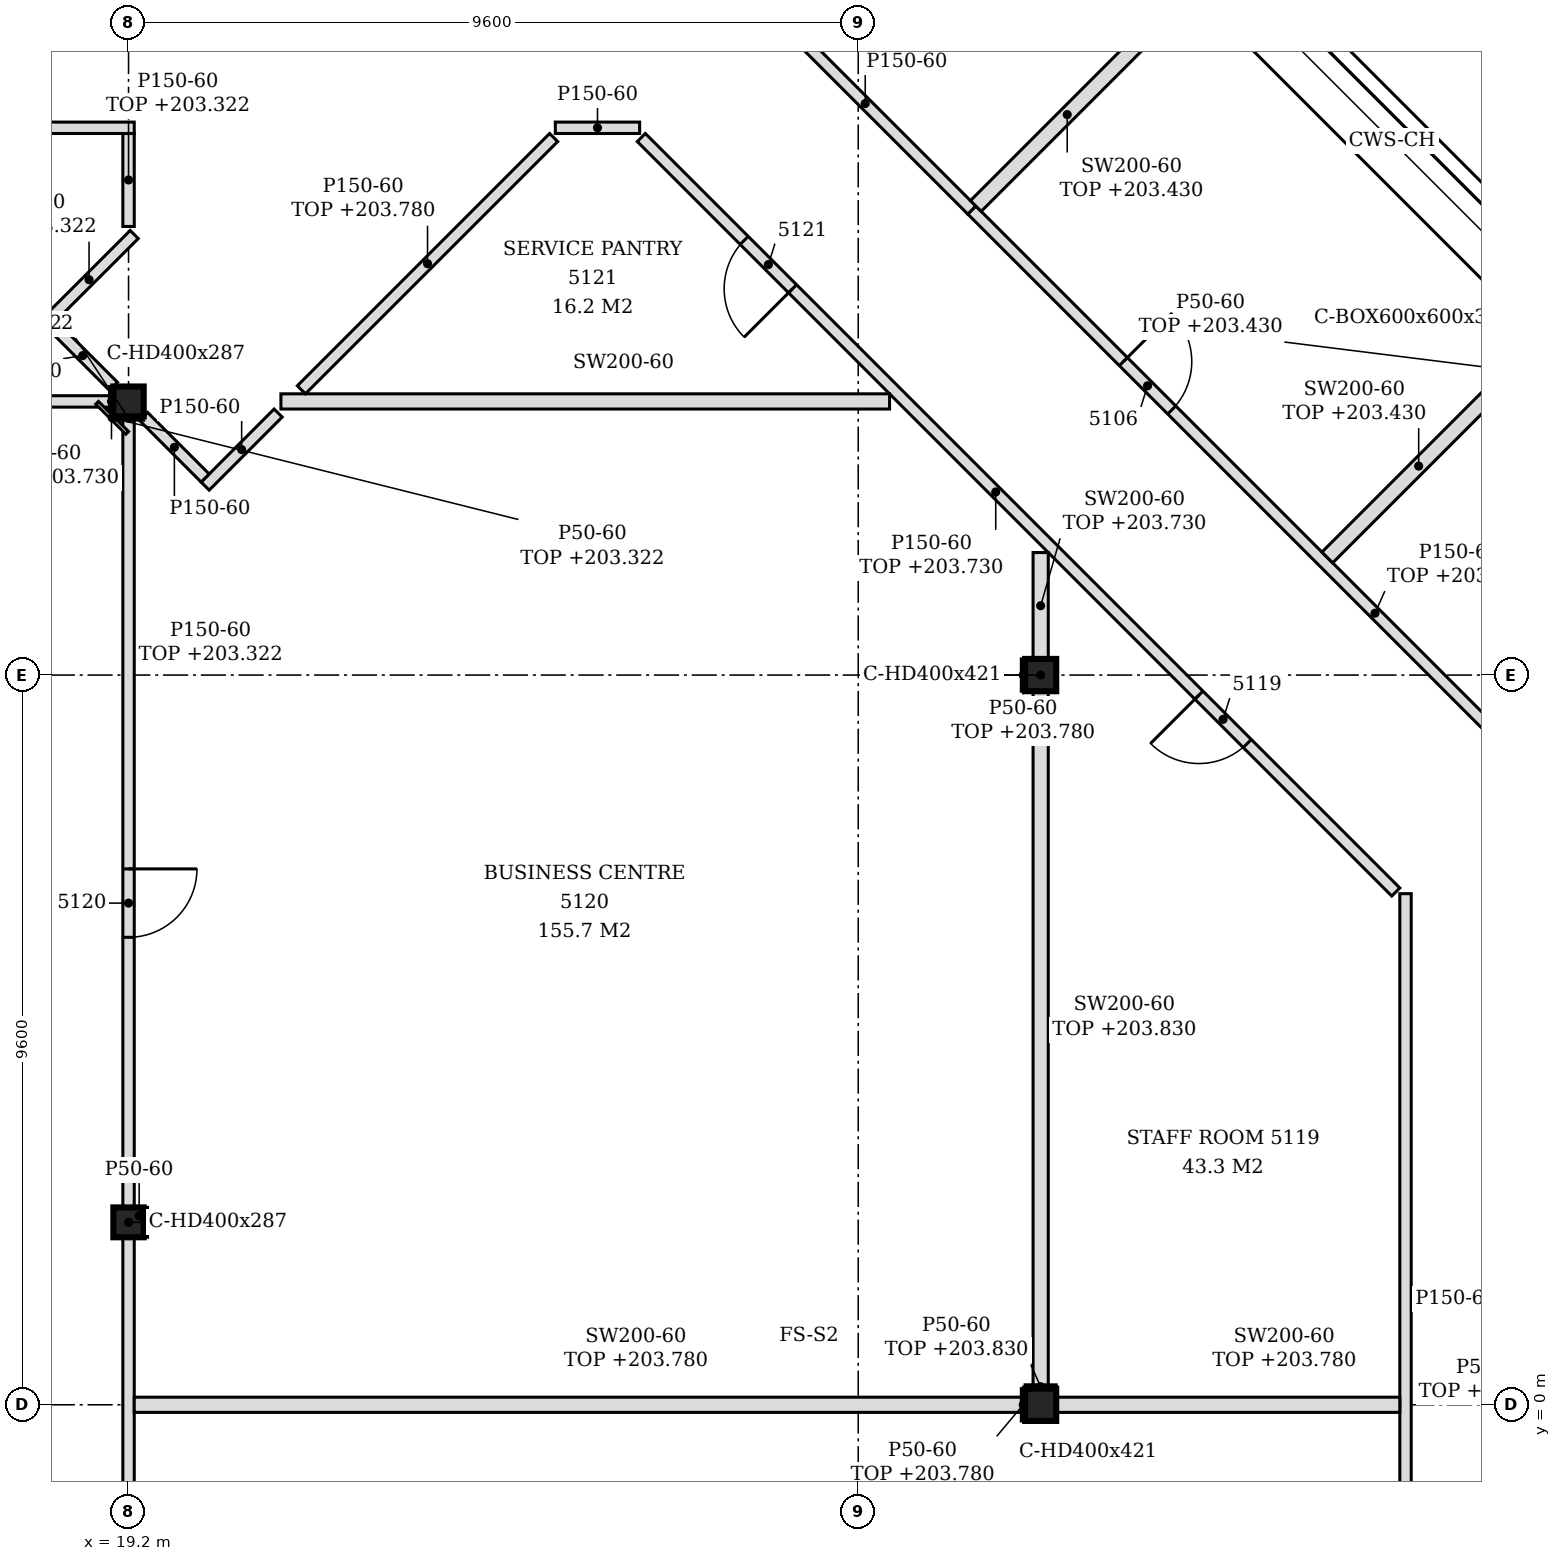
"""IFC4 building model, lengths in metres.
Left out: names, types, materials, properties, quantities, classifications, styles, units other than length and angle.
Written with IfcOpenShell. Run it as: python <this file> out.ifc"""

import sys

from ifc_helpers import new_model, si_unit, direction, frame, frame_2d, origin, origin_2d, place, context, subcontext, project, spatial, polyline, rectangle, i_section, outline, extrude, element, fill, save


model = new_model("IFC4")
c1 = context("Model", 3, precision=1e-05, world=origin(), true_north=direction((0.0, 1.0)))
c2 = subcontext(c1, "Body", "Model", "MODEL_VIEW")
j1 = project(units=[si_unit("LENGTHUNIT", "METRE"), si_unit("PLANEANGLEUNIT", "RADIAN")], contexts=[c1])
p1 = place(None, origin())
s1 = spatial("IfcSite", under=j1, at=p1, CompositionType="ELEMENT")
p2 = place(p1, origin())
s2 = spatial("IfcBuilding", under=s1, at=p2, CompositionType="ELEMENT")
p3 = place(p2, frame((0.0, 0.0, 201.0)))
s3 = spatial("IfcBuildingStorey", under=s2, at=p3, CompositionType="ELEMENT", Elevation=201.0)
for number, where, z_axis, x_axis in (
    (1, (19.2, 2.4, -0.15), (0.0, 0.0, 1.0), (1.0, 0.0, 0.0)),
    (2, (19.2, 13.2, -0.15), (0.0, 0.0, 1.0), (1.0, 0.0, 0.0)),
):
    element("IfcColumn", number, at=place(p3, frame(where, z_axis=z_axis, x_axis=x_axis)), inside=s3, PredefinedType="COLUMN", context=c2, shape_type="SweptSolid", body=[
        extrude(i_section(OverallWidth=0.399, OverallDepth=0.393, WebThickness=0.023, FlangeThickness=0.037, FilletRadius=0.015, at=origin_2d()), origin(), (0.0, 0.0, 1.0), 3.5),
    ])
for number, where, z_axis, x_axis in (
    (3, (31.2, 0.0, -0.15), (0.0, 0.0, 1.0), (1.0, 0.0, 0.0)),
    (4, (31.2, 9.6, -0.15), (0.0, 0.0, 1.0), (1.0, 0.0, 0.0)),
):
    element("IfcColumn", number, at=place(p3, frame(where, z_axis=z_axis, x_axis=x_axis)), inside=s3, PredefinedType="COLUMN", context=c2, shape_type="SweptSolid", body=[
        extrude(i_section(OverallWidth=0.409, OverallDepth=0.425, WebThickness=0.033, FlangeThickness=0.052, FilletRadius=0.015, at=origin_2d()), origin(), (0.0, 0.0, 1.0), 3.5),
    ])
p4 = place(p3, frame((19.2, -5.925, 0.0), z_axis=(0.0, 0.0, 1.0), x_axis=(0.0, 1.0, 0.0)))
e5 = element("IfcWall", 5, at=p4, inside=s3, PredefinedType="PARTITIONING", context=c2, shape_type="SweptSolid", body=[
    extrude(rectangle(XDim=8.129, YDim=0.15, at=frame_2d((4.064, 0.0))), origin(), (0.0, 0.0, 1.0), 2.322),
])
p5 = place(p3, frame((36.0, -5.925, 0.0), z_axis=(0.0, 0.0, 1.0), x_axis=(0.0, 1.0, 0.0)))
e6 = element("IfcWall", 6, at=p5, inside=s3, PredefinedType="PARTITIONING", context=c2, shape_type="SweptSolid", body=[
    extrude(outline(polyline([(0.0, 0.0), (12.649, 0.0), (12.649, 3.35), (10.83, 3.35), (10.828, 2.78), (10.62, 2.78), (10.618, 3.35), (6.03, 3.35), (6.028, 2.78), (5.82, 2.78), (5.818, 3.35), (1.23, 3.35), (1.228, 2.78), (1.02, 2.78), (1.018, 3.35), (0.0, 3.35), (0.0, 0.0)])), frame((0.0, 0.075, 0.0), z_axis=(0.0, -1.0, 0.0), x_axis=(1.0, 0.0, 0.0)), (0.0, 0.0, 1.0), 0.15),
])
p6 = place(p5, frame((1.175, 0.0, 0.0)))
e7 = element("IfcOpeningElement", 7, at=p6, cuts=e6, PredefinedType="OPENING", context=c2, shape_type="SweptSolid", body=[
    extrude(rectangle(XDim=0.8, YDim=2.1, at=frame_2d((0.4, 1.05))), frame((0.0, 0.085, 0.0), z_axis=(0.0, -1.0, 0.0), x_axis=(1.0, 0.0, 0.0)), (0.0, 0.0, 1.0), 0.17),
])
p7 = place(p3, frame((19.275, 0.0, 0.0), z_axis=(0.0, 0.0, 1.0), x_axis=(1.0, 0.0, 0.0)))
e8 = element("IfcWall", 8, at=p7, inside=s3, PredefinedType="PARTITIONING", context=c2, shape_type="SweptSolid", body=[
    extrude(outline(polyline([(0.0, 0.0), (11.721, 0.0), (11.72, 2.78), (0.076, 2.78), (0.074, 2.322), (0.0, 2.322), (0.0, 0.0)])), frame((0.0, 0.1, 0.0), z_axis=(0.0, -1.0, 0.0), x_axis=(1.0, 0.0, 0.0)), (0.0, 0.0, 1.0), 0.2),
])
p8 = place(p3, frame((31.405, 0.0, 0.0), z_axis=(0.0, 0.0, 1.0), x_axis=(1.0, 0.0, 0.0)))
e9 = element("IfcWall", 9, at=p8, inside=s3, PredefinedType="PARTITIONING", context=c2, shape_type="SweptSolid", body=[
    extrude(rectangle(XDim=4.521, YDim=0.2, at=frame_2d((2.26, 0.0))), origin(), (0.0, 0.0, 1.0), 2.78),
])
p9 = place(p3, frame((31.2, 0.212, 0.0), z_axis=(0.0, 0.0, 1.0), x_axis=(0.0, 1.0, 0.0)))
e10 = element("IfcWall", 10, at=p9, inside=s3, PredefinedType="PARTITIONING", context=c2, shape_type="SweptSolid", body=[
    extrude(rectangle(XDim=9.175, YDim=0.2, at=frame_2d((4.587, 0.0))), origin(), (0.0, 0.0, 1.0), 2.83),
])
p10 = place(p3, frame((19.2, 2.596, 0.0), z_axis=(0.0, 0.0, 1.0), x_axis=(0.0, 1.0, 0.0)))
e11 = element("IfcWall", 11, at=p10, inside=s3, PredefinedType="PARTITIONING", context=c2, shape_type="SweptSolid", body=[
    extrude(rectangle(XDim=10.407, YDim=0.15, at=frame_2d((5.204, 0.0))), origin(), (0.0, 0.0, 1.0), 2.322),
])
p11 = place(p10, frame((3.553, 0.0, 0.0)))
e12 = element("IfcOpeningElement", 12, at=p11, cuts=e11, PredefinedType="OPENING", context=c2, shape_type="SweptSolid", body=[
    extrude(rectangle(XDim=0.9, YDim=2.1, at=frame_2d((0.45, 1.05))), frame((0.0, 0.085, 0.0), z_axis=(0.0, -1.0, 0.0), x_axis=(1.0, 0.0, 0.0)), (0.0, 0.0, 1.0), 0.17),
])
p12 = place(p3, frame((35.872, 6.746, 0.0), z_axis=(0.0, 0.0, 1.0), x_axis=(-0.707106781187, 0.707106781187, 0.0)))
e13 = element("IfcWall", 13, at=p12, inside=s3, PredefinedType="PARTITIONING", context=c2, shape_type="SweptSolid", body=[
    extrude(rectangle(XDim=14.038, YDim=0.15, at=frame_2d((7.019, 0.0))), origin(), (0.0, 0.0, 1.0), 2.73),
])
p13 = place(p12, frame((2.763, 0.0, 0.0)))
e14 = element("IfcOpeningElement", 14, at=p13, cuts=e13, PredefinedType="OPENING", context=c2, shape_type="SweptSolid", body=[
    extrude(rectangle(XDim=0.9, YDim=2.1, at=frame_2d((0.45, 1.05))), frame((0.0, 0.085, 0.0), z_axis=(0.0, -1.0, 0.0), x_axis=(1.0, 0.0, 0.0)), (0.0, 0.0, 1.0), 0.17),
])
p14 = place(p12, frame((11.223, 0.0, 0.0)))
e15 = element("IfcOpeningElement", 15, at=p14, cuts=e13, PredefinedType="OPENING", context=c2, shape_type="SweptSolid", body=[
    extrude(rectangle(XDim=0.9, YDim=2.1, at=frame_2d((0.45, 1.05))), frame((0.0, 0.085, 0.0), z_axis=(0.0, -1.0, 0.0), x_axis=(1.0, 0.0, 0.0)), (0.0, 0.0, 1.0), 0.17),
])
p15 = place(p3, frame((38.272, 7.74, 0.0), z_axis=(0.0, 0.0, 1.0), x_axis=(-0.707106781187, 0.707106781187, 0.0)))
e16 = element("IfcWall", 16, at=p15, inside=s3, PredefinedType="PARTITIONING", context=c2, shape_type="SweptSolid", body=[
    extrude(rectangle(XDim=11.283, YDim=0.15, at=frame_2d((5.641, 0.0))), origin(), (0.0, 0.0, 1.0), 2.73),
])
p16 = place(p15, frame((7.562, 0.0, 0.0)))
e17 = element("IfcOpeningElement", 17, at=p16, cuts=e16, PredefinedType="OPENING", context=c2, shape_type="SweptSolid", body=[
    extrude(rectangle(XDim=0.9, YDim=2.1, at=frame_2d((0.45, 1.05))), frame((0.0, 0.085, 0.0), z_axis=(0.0, -1.0, 0.0), x_axis=(1.0, 0.0, 0.0)), (0.0, 0.0, 1.0), 0.17),
])
p17 = place(p3, frame((31.2, 9.812, 0.0), z_axis=(0.0, 0.0, 1.0), x_axis=(0.0, 1.0, 0.0)))
e18 = element("IfcWall", 18, at=p17, inside=s3, PredefinedType="PARTITIONING", context=c2, shape_type="SweptSolid", body=[
    extrude(rectangle(XDim=1.399, YDim=0.2, at=frame_2d((0.7, 0.0))), origin(), (0.0, 0.0, 1.0), 2.73),
])
p18 = place(p3, frame((34.971, 11.147, 0.0), z_axis=(0.0, 0.0, 1.0), x_axis=(0.707106781187, 0.707106781187, 0.0)))
e19 = element("IfcWall", 19, at=p18, inside=s3, PredefinedType="PARTITIONING", context=c2, shape_type="SweptSolid", body=[
    extrude(rectangle(XDim=3.401, YDim=0.2, at=frame_2d((1.7, 0.0))), origin(), (0.0, 0.0, 1.0), 2.43),
])
p19 = place(p3, frame((20.208, 12.086, 0.0), z_axis=(0.0, 0.0, 1.0), x_axis=(0.706747296365, 0.707466083343, 0.0)))
e20 = element("IfcWall", 20, at=p19, inside=s3, PredefinedType="PARTITIONING", context=c2, shape_type="SweptSolid", body=[
    extrude(rectangle(XDim=1.359, YDim=0.15, at=frame_2d((0.679, 0.0))), origin(), (0.0, 0.0, 1.0), 3.35),
])
p20 = place(p3, frame((20.208, 12.192, 0.0), z_axis=(0.0, 0.0, 1.0), x_axis=(-0.70721334539, 0.707000200921, 0.0)))
e21 = element("IfcWall", 21, at=p20, inside=s3, PredefinedType="PARTITIONING", context=c2, shape_type="SweptSolid", body=[
    extrude(rectangle(XDim=1.146, YDim=0.15, at=frame_2d((0.573, 0.0))), origin(), (0.0, 0.0, 1.0), 3.35),
])
p21 = place(p3, frame((7.399, 13.2, 0.0), z_axis=(0.0, 0.0, 1.0), x_axis=(1.0, 0.0, 0.0)))
e22 = element("IfcWall", 22, at=p21, inside=s3, PredefinedType="PARTITIONING", context=c2, shape_type="SweptSolid", body=[
    extrude(rectangle(XDim=11.601, YDim=0.15, at=frame_2d((5.801, 0.0))), origin(), (0.0, 0.0, 1.0), 2.73),
])
p22 = place(p21, frame((5.351, 0.0, 0.0)))
e23 = element("IfcOpeningElement", 23, at=p22, cuts=e22, PredefinedType="OPENING", context=c2, shape_type="SweptSolid", body=[
    extrude(rectangle(XDim=0.9, YDim=2.1, at=frame_2d((0.45, 1.05))), frame((0.0, 0.085, 0.0), z_axis=(0.0, -1.0, 0.0), x_axis=(1.0, 0.0, 0.0)), (0.0, 0.0, 1.0), 0.17),
])
p23 = place(p3, frame((21.205, 13.2, 0.0), z_axis=(0.0, 0.0, 1.0), x_axis=(1.0, 0.0, 0.0)))
e24 = element("IfcWall", 24, at=p23, inside=s3, PredefinedType="PARTITIONING", context=c2, shape_type="SweptSolid", body=[
    extrude(rectangle(XDim=8.007, YDim=0.2, at=frame_2d((4.004, 0.0))), origin(), (0.0, 0.0, 1.0), 3.35),
])
p24 = place(p3, frame((19.002, 13.398, 0.0), z_axis=(0.0, 0.0, 1.0), x_axis=(-0.707000200921, 0.70721334539, 0.0)))
e25 = element("IfcWall", 25, at=p24, inside=s3, PredefinedType="PARTITIONING", context=c2, shape_type="SweptSolid", body=[
    extrude(rectangle(XDim=1.146, YDim=0.15, at=frame_2d((0.573, 0.0))), origin(), (0.0, 0.0, 1.0), 3.35),
])
p25 = place(p3, frame((21.474, 13.353, 0.0), z_axis=(0.0, 0.0, 1.0), x_axis=(0.707080773618, 0.707132787799, 0.0)))
e26 = element("IfcWall", 26, at=p25, inside=s3, PredefinedType="PARTITIONING", context=c2, shape_type="SweptSolid", body=[
    extrude(rectangle(XDim=4.694, YDim=0.15, at=frame_2d((2.347, 0.0))), origin(), (0.0, 0.0, 1.0), 2.78),
])
p26 = place(p3, frame((18.086, 14.208, 0.0), z_axis=(0.0, 0.0, 1.0), x_axis=(0.70739723372, 0.706816209298, 0.0)))
e27 = element("IfcWall", 27, at=p26, inside=s3, PredefinedType="PARTITIONING", context=c2, shape_type="SweptSolid", body=[
    extrude(rectangle(XDim=1.681, YDim=0.15, at=frame_2d((0.84, 0.0))), origin(), (0.0, 0.0, 1.0), 2.322),
])
p27 = place(p3, frame((19.2, 15.502, 0.0), z_axis=(0.0, 0.0, 1.0), x_axis=(0.0, 1.0, 0.0)))
e28 = element("IfcWall", 28, at=p27, inside=s3, PredefinedType="PARTITIONING", context=c2, shape_type="SweptSolid", body=[
    extrude(rectangle(XDim=1.223, YDim=0.15, at=frame_2d((0.612, 0.0))), origin(), (0.0, 0.0, 1.0), 2.322),
])
p28 = place(p3, frame((30.294, 15.718, 0.0), z_axis=(0.0, 0.0, 1.0), x_axis=(-0.707229938335, 0.706983602584, 0.0)))
e29 = element("IfcWall", 29, at=p28, inside=s3, PredefinedType="PARTITIONING", context=c2, shape_type="SweptSolid", body=[
    extrude(rectangle(XDim=3.964, YDim=0.15, at=frame_2d((1.982, 0.0))), origin(), (0.0, 0.0, 1.0), 3.35),
])
p29 = place(p3, frame((30.347, 15.771, 0.0), z_axis=(0.0, 0.0, 1.0), x_axis=(0.707142675843, 0.707070884708, 0.0)))
e30 = element("IfcWall", 30, at=p29, inside=s3, PredefinedType="PARTITIONING", context=c2, shape_type="SweptSolid", body=[
    extrude(rectangle(XDim=3.401, YDim=0.2, at=frame_2d((1.7, 0.0))), origin(), (0.0, 0.0, 1.0), 2.43),
])
p30 = place(p3, frame((7.125, 16.8, 0.0), z_axis=(0.0, 0.0, 1.0), x_axis=(1.0, 0.0, 0.0)))
e31 = element("IfcWall", 31, at=p30, inside=s3, PredefinedType="PARTITIONING", context=c2, shape_type="SweptSolid", body=[
    extrude(outline(polyline([(0.0, 0.0), (12.15, 0.0), (12.15, 2.322), (11.924, 2.322), (11.922, 3.35), (0.225, 3.35), (0.223, 2.83), (0.0, 2.83), (0.0, 0.0)])), frame((0.0, 0.075, 0.0), z_axis=(0.0, -1.0, 0.0), x_axis=(1.0, 0.0, 0.0)), (0.0, 0.0, 1.0), 0.15),
])
p31 = place(p3, frame((24.815, 16.8, 0.0), z_axis=(0.0, 0.0, 1.0), x_axis=(1.0, 0.0, 0.0)))
e32 = element("IfcWall", 32, at=p31, inside=s3, PredefinedType="PARTITIONING", context=c2, shape_type="SweptSolid", body=[
    extrude(rectangle(XDim=1.109, YDim=0.15, at=frame_2d((0.555, 0.0))), origin(), (0.0, 0.0, 1.0), 3.35),
])
p32 = place(p3, frame((19.425, 2.204, 0.0), z_axis=(0.0, 0.0, 1.0), x_axis=(0.0, 1.0, 0.0)))
e33 = element("IfcWall", 33, at=p32, inside=s3, PredefinedType="PARTITIONING", context=c2, shape_type="SweptSolid", body=[
    extrude(rectangle(XDim=0.393, YDim=0.05, at=frame_2d((0.196, 0.0))), origin(), (0.0, 0.0, 1.0), 3.35),
])
p33 = place(p3, frame((18.976, 13.003, 0.0), z_axis=(0.0, 0.0, 1.0), x_axis=(0.0, 1.0, 0.0)))
e34 = element("IfcWall", 34, at=p33, inside=s3, PredefinedType="PARTITIONING", context=c2, shape_type="SweptSolid", body=[
    extrude(rectangle(XDim=0.393, YDim=0.05, at=frame_2d((0.197, 0.0))), origin(), (0.0, 0.0, 1.0), 2.73),
])
p34 = place(p3, frame((30.996, 0.238, 0.0), z_axis=(0.0, 0.0, 1.0), x_axis=(1.0, 0.0, 0.0)))
e35 = element("IfcWall", 35, at=p34, inside=s3, PredefinedType="PARTITIONING", context=c2, shape_type="SweptSolid", body=[
    extrude(rectangle(XDim=0.409, YDim=0.05, at=frame_2d((0.205, 0.0))), origin(), (0.0, 0.0, 1.0), 2.83),
])
p35 = place(p3, frame((30.97, -0.212, 0.0), z_axis=(0.0, 0.0, 1.0), x_axis=(0.0, 1.0, 0.0)))
e36 = element("IfcWall", 36, at=p35, inside=s3, PredefinedType="PARTITIONING", context=c2, shape_type="SweptSolid", body=[
    extrude(rectangle(XDim=0.425, YDim=0.05, at=frame_2d((0.212, 0.0))), origin(), (0.0, 0.0, 1.0), 2.78),
])
p36 = place(p3, frame((30.97, 9.387, 0.0), z_axis=(0.0, 0.0, 1.0), x_axis=(0.0, 1.0, 0.0)))
e37 = element("IfcWall", 37, at=p36, inside=s3, PredefinedType="PARTITIONING", context=c2, shape_type="SweptSolid", body=[
    extrude(rectangle(XDim=0.425, YDim=0.05, at=frame_2d((0.212, 0.0))), origin(), (0.0, 0.0, 1.0), 2.78),
])
p37 = place(p3, frame((19.182, 12.786, 0.0), z_axis=(0.0, 0.0, 1.0), x_axis=(-0.707106781187, 0.707106781187, 0.0)))
e38 = element("IfcWall", 38, at=p37, inside=s3, PredefinedType="PARTITIONING", context=c2, shape_type="SweptSolid", body=[
    extrude(rectangle(XDim=0.56, YDim=0.05, at=frame_2d((0.28, 0.0))), origin(), (0.0, 0.0, 1.0), 2.322),
])
p38 = place(p3, frame((19.0, 12.979, 0.0), z_axis=(0.0, 0.0, 1.0), x_axis=(1.0, 0.0, 0.0)))
e39 = element("IfcWall", 39, at=p38, inside=s3, PredefinedType="PARTITIONING", context=c2, shape_type="SweptSolid", body=[
    extrude(rectangle(XDim=0.399, YDim=0.05, at=frame_2d((0.199, 0.0))), origin(), (0.0, 0.0, 1.0), 2.322),
])
p39 = place(p16, frame((0.9, 0.0, 0.0), z_axis=(0.0, 0.0, 1.0), x_axis=(-1.0, 0.0, 0.0)))
e40 = element("IfcDoor", 40, at=p39, inside=s3, OperationType="SINGLE_SWING_LEFT", PredefinedType="DOOR", context=c2, shape_type="SweptSolid", body=[
    extrude(rectangle(XDim=0.9, YDim=2.1, at=frame_2d((0.45, 1.05))), frame((0.0, 0.025, 0.0), z_axis=(0.0, -1.0, 0.0), x_axis=(1.0, 0.0, 0.0)), (0.0, 0.0, 1.0), 0.05),
])
fill(e17, e40)
p40 = place(p13, origin())
e41 = element("IfcDoor", 41, at=p40, inside=s3, OperationType="SINGLE_SWING_RIGHT", PredefinedType="DOOR", context=c2, shape_type="SweptSolid", body=[
    extrude(rectangle(XDim=0.9, YDim=2.1, at=frame_2d((0.45, 1.05))), frame((0.0, 0.025, 0.0), z_axis=(0.0, -1.0, 0.0), x_axis=(1.0, 0.0, 0.0)), (0.0, 0.0, 1.0), 0.05),
])
fill(e14, e41)
p41 = place(p11, frame((0.9, 0.0, 0.0), z_axis=(0.0, 0.0, 1.0), x_axis=(-1.0, 0.0, 0.0)))
e42 = element("IfcDoor", 42, at=p41, inside=s3, OperationType="SINGLE_SWING_LEFT", PredefinedType="DOOR", context=c2, shape_type="SweptSolid", body=[
    extrude(rectangle(XDim=0.9, YDim=2.1, at=frame_2d((0.45, 1.05))), frame((0.0, 0.025, 0.0), z_axis=(0.0, -1.0, 0.0), x_axis=(1.0, 0.0, 0.0)), (0.0, 0.0, 1.0), 0.05),
])
fill(e12, e42)
p42 = place(p14, origin())
e43 = element("IfcDoor", 43, at=p42, inside=s3, OperationType="SINGLE_SWING_LEFT", PredefinedType="DOOR", context=c2, shape_type="SweptSolid", body=[
    extrude(rectangle(XDim=0.9, YDim=2.1, at=frame_2d((0.45, 1.05))), frame((0.0, 0.025, 0.0), z_axis=(0.0, -1.0, 0.0), x_axis=(1.0, 0.0, 0.0)), (0.0, 0.0, 1.0), 0.05),
])
fill(e15, e43)
save(model, sys.argv[1])
